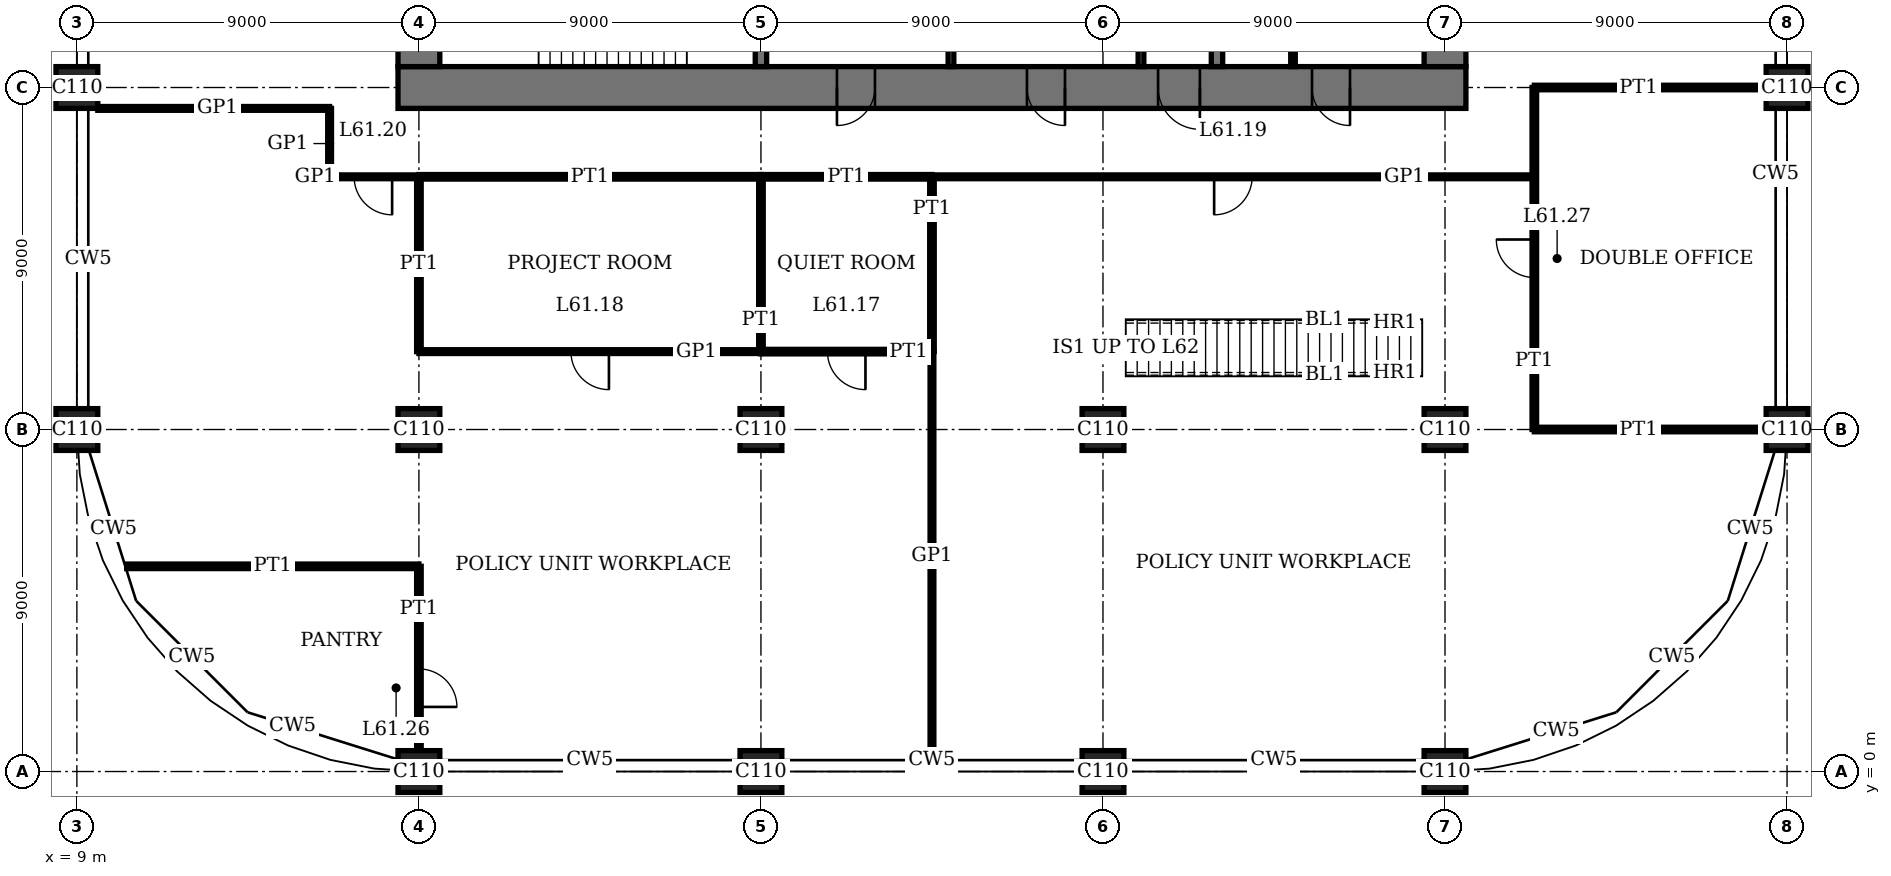
"""IFC4 building model, lengths in metres.
Left out: names, types, materials, properties, quantities, classifications, styles, units other than length and angle.
Written with IfcOpenShell. Run it as: python <this file> out.ifc"""

import sys

from ifc_helpers import new_model, si_unit, direction, frame, frame_2d, origin, origin_2d, place, context, subcontext, project, spatial, rectangle, extrude, element, fill, save


model = new_model("IFC4")
c1 = context("Model", 3, precision=1e-05, world=origin(), true_north=direction((0.0, 1.0)))
c2 = subcontext(c1, "Body", "Model", "MODEL_VIEW")
j1 = project(units=[si_unit("LENGTHUNIT", "METRE"), si_unit("PLANEANGLEUNIT", "RADIAN")], contexts=[c1])
p1 = place(None, origin())
s1 = spatial("IfcSite", under=j1, at=p1, CompositionType="ELEMENT")
p2 = place(p1, origin())
s2 = spatial("IfcBuilding", under=s1, at=p2, CompositionType="ELEMENT")
p3 = place(p2, frame((0.0, 0.0, 251.4)))
s3 = spatial("IfcBuildingStorey", under=s2, at=p3, CompositionType="ELEMENT", Elevation=251.4)
for number, where, z_axis, x_axis in (
    (1, (9.0, 9.0, 0.0), (0.0, 0.0, 1.0), (1.0, 0.0, 0.0)),
    (2, (9.0, 18.0, 0.0), (0.0, 0.0, 1.0), (1.0, 0.0, 0.0)),
    (3, (18.0, 0.0, 0.0), (0.0, 0.0, 1.0), (1.0, 0.0, 0.0)),
    (4, (18.0, 9.0, 0.0), (0.0, 0.0, 1.0), (1.0, 0.0, 0.0)),
    (5, (27.0, 0.0, 0.0), (0.0, 0.0, 1.0), (1.0, 0.0, 0.0)),
    (6, (27.0, 9.0, 0.0), (0.0, 0.0, 1.0), (1.0, 0.0, 0.0)),
    (7, (36.0, 0.0, 0.0), (0.0, 0.0, 1.0), (1.0, 0.0, 0.0)),
    (8, (36.0, 9.0, 0.0), (0.0, 0.0, 1.0), (1.0, 0.0, 0.0)),
    (9, (45.0, 0.0, 0.0), (0.0, 0.0, 1.0), (1.0, 0.0, 0.0)),
    (10, (45.0, 9.0, 0.0), (0.0, 0.0, 1.0), (1.0, 0.0, 0.0)),
    (11, (54.0, 9.0, 0.0), (0.0, 0.0, 1.0), (1.0, 0.0, 0.0)),
    (12, (54.0, 18.0, 0.0), (0.0, 0.0, 1.0), (1.0, 0.0, 0.0)),
):
    element("IfcColumn", number, at=place(p3, frame(where, z_axis=z_axis, x_axis=x_axis)), inside=s3, PredefinedType="COLUMN", context=c2, shape_type="SweptSolid", body=[
        extrude(rectangle(XDim=1.1, YDim=1.1, at=origin_2d()), origin(), (0.0, 0.0, 1.0), 4.0),
    ])
p4 = place(p3, frame((17.45, 18.0, 0.0), z_axis=(0.0, 0.0, 1.0), x_axis=(1.0, 0.0, 0.0)))
e13 = element("IfcWall", 13, at=p4, inside=s3, PredefinedType="SHEAR", context=c2, shape_type="SweptSolid", body=[
    extrude(rectangle(XDim=28.1, YDim=1.1, at=frame_2d((14.05, 0.0))), origin(), (0.0, 0.0, 1.0), 4.0),
])
p5 = place(p4, frame((11.55, 0.0, 0.0)))
e14 = element("IfcOpeningElement", 14, at=p5, cuts=e13, PredefinedType="OPENING", context=c2, shape_type="SweptSolid", body=[
    extrude(rectangle(XDim=1.0, YDim=2.4, at=frame_2d((0.5, 1.2))), frame((0.0, 0.56, 0.0), z_axis=(0.0, -1.0, 0.0), x_axis=(1.0, 0.0, 0.0)), (0.0, 0.0, 1.0), 1.12),
])
p6 = place(p4, frame((16.55, 0.0, 0.0)))
e15 = element("IfcOpeningElement", 15, at=p6, cuts=e13, PredefinedType="OPENING", context=c2, shape_type="SweptSolid", body=[
    extrude(rectangle(XDim=1.0, YDim=2.4, at=frame_2d((0.5, 1.2))), frame((0.0, 0.56, 0.0), z_axis=(0.0, -1.0, 0.0), x_axis=(1.0, 0.0, 0.0)), (0.0, 0.0, 1.0), 1.12),
])
p7 = place(p4, frame((20.0, 0.0, 0.0)))
e16 = element("IfcOpeningElement", 16, at=p7, cuts=e13, PredefinedType="OPENING", context=c2, shape_type="SweptSolid", body=[
    extrude(rectangle(XDim=1.1, YDim=2.4, at=frame_2d((0.55, 1.2))), frame((0.0, 0.56, 0.0), z_axis=(0.0, -1.0, 0.0), x_axis=(1.0, 0.0, 0.0)), (0.0, 0.0, 1.0), 1.12),
])
p8 = place(p4, frame((24.05, 0.0, 0.0)))
e17 = element("IfcOpeningElement", 17, at=p8, cuts=e13, PredefinedType="OPENING", context=c2, shape_type="SweptSolid", body=[
    extrude(rectangle(XDim=1.0, YDim=2.4, at=frame_2d((0.5, 1.2))), frame((0.0, 0.56, 0.0), z_axis=(0.0, -1.0, 0.0), x_axis=(1.0, 0.0, 0.0)), (0.0, 0.0, 1.0), 1.12),
])
p9 = place(p3, frame((18.0, 35.45, 0.0), z_axis=(0.0, 0.0, 1.0), x_axis=(0.0, -1.0, 0.0)))
e18 = element("IfcWall", 18, at=p9, inside=s3, PredefinedType="SHEAR", context=c2, shape_type="SweptSolid", body=[
    extrude(rectangle(XDim=16.9, YDim=1.1, at=frame_2d((8.45, 0.0))), origin(), (0.0, 0.0, 1.0), 4.0),
])
p10 = place(p9, frame((8.45, 0.0, 0.0)))
e19 = element("IfcOpeningElement", 19, at=p10, cuts=e18, PredefinedType="OPENING", context=c2, shape_type="SweptSolid", body=[
    extrude(rectangle(XDim=1.8, YDim=2.4, at=frame_2d((0.9, 1.2))), frame((0.0, 0.56, 0.0), z_axis=(0.0, -1.0, 0.0), x_axis=(1.0, 0.0, 0.0)), (0.0, 0.0, 1.0), 1.12),
])
p11 = place(p3, frame((45.0, 18.55, 0.0), z_axis=(0.0, 0.0, 1.0), x_axis=(0.0, 1.0, 0.0)))
e20 = element("IfcWall", 20, at=p11, inside=s3, PredefinedType="SHEAR", context=c2, shape_type="SweptSolid", body=[
    extrude(rectangle(XDim=16.9, YDim=1.1, at=frame_2d((8.45, 0.0))), origin(), (0.0, 0.0, 1.0), 4.0),
])
p12 = place(p11, frame((8.45, 0.0, 0.0)))
e21 = element("IfcOpeningElement", 21, at=p12, cuts=e20, PredefinedType="OPENING", context=c2, shape_type="SweptSolid", body=[
    extrude(rectangle(XDim=1.8, YDim=2.4, at=frame_2d((0.9, 1.2))), frame((0.0, 0.56, 0.0), z_axis=(0.0, -1.0, 0.0), x_axis=(1.0, 0.0, 0.0)), (0.0, 0.0, 1.0), 1.12),
])
p13 = place(p3, frame((27.0, 18.55, 0.0), z_axis=(0.0, 0.0, 1.0), x_axis=(0.0, 1.0, 0.0)))
e22 = element("IfcWall", 22, at=p13, inside=s3, PredefinedType="SHEAR", context=c2, shape_type="SweptSolid", body=[
    extrude(rectangle(XDim=3.05, YDim=0.3, at=frame_2d((1.525, 0.0))), origin(), (0.0, 0.0, 1.0), 4.0),
])
p14 = place(p3, frame((39.0, 18.55, 0.0), z_axis=(0.0, 0.0, 1.0), x_axis=(0.0, 1.0, 0.0)))
e23 = element("IfcWall", 23, at=p14, inside=s3, PredefinedType="SHEAR", context=c2, shape_type="SweptSolid", body=[
    extrude(rectangle(XDim=5.9, YDim=0.3, at=frame_2d((2.95, 0.0))), origin(), (0.0, 0.0, 1.0), 4.0),
])
p15 = place(p3, frame((10.31, 5.4, 0.0), z_axis=(0.0, 0.0, 1.0), x_axis=(1.0, 0.0, 0.0)))
e24 = element("IfcWall", 24, at=p15, inside=s3, PredefinedType="PARTITIONING", context=c2, shape_type="SweptSolid", body=[
    extrude(rectangle(XDim=7.69, YDim=0.12, at=frame_2d((3.845, 0.0))), origin(), (0.0, 0.0, 1.0), 3.75),
])
p16 = place(p3, frame((47.35, 9.0, 0.0), z_axis=(0.0, 0.0, 1.0), x_axis=(1.0, 0.0, 0.0)))
e25 = element("IfcWall", 25, at=p16, inside=s3, PredefinedType="PARTITIONING", context=c2, shape_type="SweptSolid", body=[
    extrude(rectangle(XDim=6.1, YDim=0.12, at=frame_2d((3.05, 0.0))), origin(), (0.0, 0.0, 1.0), 3.05),
])
p17 = place(p3, frame((27.0, 11.05, 0.0), z_axis=(0.0, 0.0, 1.0), x_axis=(1.0, 0.0, 0.0)))
e26 = element("IfcWall", 26, at=p17, inside=s3, PredefinedType="PARTITIONING", context=c2, shape_type="SweptSolid", body=[
    extrude(rectangle(XDim=4.5, YDim=0.12, at=frame_2d((2.25, 0.0))), origin(), (0.0, 0.0, 1.0), 3.75),
])
p18 = place(p17, frame((1.75, 0.0, 0.0)))
e27 = element("IfcOpeningElement", 27, at=p18, cuts=e26, PredefinedType="OPENING", context=c2, shape_type="SweptSolid", body=[
    extrude(rectangle(XDim=1.0, YDim=2.4, at=frame_2d((0.5, 1.2))), frame((0.0, 0.07, 0.0), z_axis=(0.0, -1.0, 0.0), x_axis=(1.0, 0.0, 0.0)), (0.0, 0.0, 1.0), 0.14),
])
p19 = place(p3, frame((18.0, 11.05, 0.0), z_axis=(0.0, 0.0, 1.0), x_axis=(1.0, 0.0, 0.0)))
e28 = element("IfcWall", 28, at=p19, inside=s3, PredefinedType="PARTITIONING", context=c2, shape_type="SweptSolid", body=[
    extrude(rectangle(XDim=9.0, YDim=0.1, at=frame_2d((4.5, 0.0))), origin(), (0.0, 0.0, 1.0), 3.75),
])
p20 = place(p19, frame((4.0, 0.0, 0.0)))
e29 = element("IfcOpeningElement", 29, at=p20, cuts=e28, PredefinedType="OPENING", context=c2, shape_type="SweptSolid", body=[
    extrude(rectangle(XDim=1.0, YDim=2.4, at=frame_2d((0.5, 1.2))), frame((0.0, 0.06, 0.0), z_axis=(0.0, -1.0, 0.0), x_axis=(1.0, 0.0, 0.0)), (0.0, 0.0, 1.0), 0.12),
])
p21 = place(p3, frame((18.0, 15.65, 0.0), z_axis=(0.0, 0.0, 1.0), x_axis=(1.0, 0.0, 0.0)))
e30 = element("IfcWall", 30, at=p21, inside=s3, PredefinedType="PARTITIONING", context=c2, shape_type="SweptSolid", body=[
    extrude(rectangle(XDim=9.0, YDim=0.12, at=frame_2d((4.5, 0.0))), origin(), (0.0, 0.0, 1.0), 3.75),
])
p22 = place(p3, frame((27.0, 15.65, 0.0), z_axis=(0.0, 0.0, 1.0), x_axis=(1.0, 0.0, 0.0)))
e31 = element("IfcWall", 31, at=p22, inside=s3, PredefinedType="PARTITIONING", context=c2, shape_type="SweptSolid", body=[
    extrude(rectangle(XDim=4.5, YDim=0.12, at=frame_2d((2.25, 0.0))), origin(), (0.0, 0.0, 1.0), 3.75),
])
p23 = place(p3, frame((31.51, 15.65, 0.0), z_axis=(0.0, 0.0, 1.0), x_axis=(1.0, 0.0, 0.0)))
e32 = element("IfcWall", 32, at=p23, inside=s3, PredefinedType="PARTITIONING", context=c2, shape_type="SweptSolid", body=[
    extrude(rectangle(XDim=15.83, YDim=0.1, at=frame_2d((7.915, 0.0))), origin(), (0.0, 0.0, 1.0), 3.75),
])
p24 = place(p23, frame((7.415, 0.0, 0.0)))
e33 = element("IfcOpeningElement", 33, at=p24, cuts=e32, PredefinedType="OPENING", context=c2, shape_type="SweptSolid", body=[
    extrude(rectangle(XDim=1.0, YDim=2.4, at=frame_2d((0.5, 1.2))), frame((0.0, 0.06, 0.0), z_axis=(0.0, -1.0, 0.0), x_axis=(1.0, 0.0, 0.0)), (0.0, 0.0, 1.0), 0.12),
])
p25 = place(p3, frame((15.6, 15.65, 0.0), z_axis=(0.0, 0.0, 1.0), x_axis=(1.0, 0.0, 0.0)))
e34 = element("IfcWall", 34, at=p25, inside=s3, PredefinedType="PARTITIONING", context=c2, shape_type="SweptSolid", body=[
    extrude(rectangle(XDim=2.39, YDim=0.1, at=frame_2d((1.195, 0.0))), origin(), (0.0, 0.0, 1.0), 3.75),
])
p26 = place(p25, frame((0.695, 0.0, 0.0)))
e35 = element("IfcOpeningElement", 35, at=p26, cuts=e34, PredefinedType="OPENING", context=c2, shape_type="SweptSolid", body=[
    extrude(rectangle(XDim=1.0, YDim=2.4, at=frame_2d((0.5, 1.2))), frame((0.0, 0.06, 0.0), z_axis=(0.0, -1.0, 0.0), x_axis=(1.0, 0.0, 0.0)), (0.0, 0.0, 1.0), 0.12),
])
p27 = place(p3, frame((9.55, 17.45, 0.0), z_axis=(0.0, 0.0, 1.0), x_axis=(1.0, 0.0, 0.0)))
e36 = element("IfcWall", 36, at=p27, inside=s3, PredefinedType="PARTITIONING", context=c2, shape_type="SweptSolid", body=[
    extrude(rectangle(XDim=6.1, YDim=0.1, at=frame_2d((3.05, 0.0))), origin(), (0.0, 0.0, 1.0), 3.75),
])
p28 = place(p3, frame((47.35, 18.0, 0.0), z_axis=(0.0, 0.0, 1.0), x_axis=(1.0, 0.0, 0.0)))
e37 = element("IfcWall", 37, at=p28, inside=s3, PredefinedType="PARTITIONING", context=c2, shape_type="SweptSolid", body=[
    extrude(rectangle(XDim=6.1, YDim=0.12, at=frame_2d((3.05, 0.0))), origin(), (0.0, 0.0, 1.0), 3.05),
])
p29 = place(p3, frame((15.65, 15.6, 0.0), z_axis=(0.0, 0.0, 1.0), x_axis=(0.0, 1.0, 0.0)))
e38 = element("IfcWall", 38, at=p29, inside=s3, PredefinedType="PARTITIONING", context=c2, shape_type="SweptSolid", body=[
    extrude(rectangle(XDim=1.85, YDim=0.1, at=frame_2d((0.925, 0.0))), origin(), (0.0, 0.0, 1.0), 3.75),
])
p30 = place(p3, frame((18.0, 11.05, 0.0), z_axis=(0.0, 0.0, 1.0), x_axis=(0.0, 1.0, 0.0)))
e39 = element("IfcWall", 39, at=p30, inside=s3, PredefinedType="PARTITIONING", context=c2, shape_type="SweptSolid", body=[
    extrude(rectangle(XDim=4.6, YDim=0.12, at=frame_2d((2.3, 0.0))), origin(), (0.0, 0.0, 1.0), 3.05),
])
p31 = place(p3, frame((18.0, 0.55, 0.0), z_axis=(0.0, 0.0, 1.0), x_axis=(0.0, 1.0, 0.0)))
e40 = element("IfcWall", 40, at=p31, inside=s3, PredefinedType="PARTITIONING", context=c2, shape_type="SweptSolid", body=[
    extrude(rectangle(XDim=4.85, YDim=0.12, at=frame_2d((2.425, 0.0))), origin(), (0.0, 0.0, 1.0), 3.05),
])
p32 = place(p31, frame((1.15, 0.0, 0.0)))
e41 = element("IfcOpeningElement", 41, at=p32, cuts=e40, PredefinedType="OPENING", context=c2, shape_type="SweptSolid", body=[
    extrude(rectangle(XDim=1.0, YDim=2.4, at=frame_2d((0.5, 1.2))), frame((0.0, 0.07, 0.0), z_axis=(0.0, -1.0, 0.0), x_axis=(1.0, 0.0, 0.0)), (0.0, 0.0, 1.0), 0.14),
])
p33 = place(p3, frame((27.0, 11.05, 0.0), z_axis=(0.0, 0.0, 1.0), x_axis=(0.0, 1.0, 0.0)))
e42 = element("IfcWall", 42, at=p33, inside=s3, PredefinedType="PARTITIONING", context=c2, shape_type="SweptSolid", body=[
    extrude(rectangle(XDim=4.6, YDim=0.12, at=frame_2d((2.3, 0.0))), origin(), (0.0, 0.0, 1.0), 3.05),
])
p34 = place(p3, frame((31.5, 11.05, 0.0), z_axis=(0.0, 0.0, 1.0), x_axis=(0.0, 1.0, 0.0)))
e43 = element("IfcWall", 43, at=p34, inside=s3, PredefinedType="PARTITIONING", context=c2, shape_type="SweptSolid", body=[
    extrude(rectangle(XDim=4.6, YDim=0.12, at=frame_2d((2.3, 0.0))), origin(), (0.0, 0.0, 1.0), 3.75),
])
p35 = place(p3, frame((31.5, 0.31, 0.0), z_axis=(0.0, 0.0, 1.0), x_axis=(0.0, 1.0, 0.0)))
e44 = element("IfcWall", 44, at=p35, inside=s3, PredefinedType="PARTITIONING", context=c2, shape_type="SweptSolid", body=[
    extrude(rectangle(XDim=10.74, YDim=0.1, at=frame_2d((5.37, 0.0))), origin(), (0.0, 0.0, 1.0), 3.75),
])
p36 = place(p3, frame((47.35, 9.0, 0.0), z_axis=(0.0, 0.0, 1.0), x_axis=(0.0, 1.0, 0.0)))
e45 = element("IfcWall", 45, at=p36, inside=s3, PredefinedType="PARTITIONING", context=c2, shape_type="SweptSolid", body=[
    extrude(rectangle(XDim=9.0, YDim=0.12, at=frame_2d((4.5, 0.0))), origin(), (0.0, 0.0, 1.0), 3.75),
])
p37 = place(p36, frame((4.0, 0.0, 0.0)))
e46 = element("IfcOpeningElement", 46, at=p37, cuts=e45, PredefinedType="OPENING", context=c2, shape_type="SweptSolid", body=[
    extrude(rectangle(XDim=1.0, YDim=2.4, at=frame_2d((0.5, 1.2))), frame((0.0, 0.07, 0.0), z_axis=(0.0, -1.0, 0.0), x_axis=(1.0, 0.0, 0.0)), (0.0, 0.0, 1.0), 0.14),
])
for number, where, z_axis, x_axis in (
    (47, (32.0, 18.55, 0.0), (0.0, 0.0, 1.0), (0.0, 1.0, 0.0)),
    (48, (37.0, 18.55, 0.0), (0.0, 0.0, 1.0), (0.0, 1.0, 0.0)),
):
    element("IfcWall", number, at=place(p3, frame(where, z_axis=z_axis, x_axis=x_axis)), inside=s3, PredefinedType="PARTITIONING", context=c2, shape_type="SweptSolid", body=[
        extrude(rectangle(XDim=2.9, YDim=0.15, at=frame_2d((1.45, 0.0))), origin(), (0.0, 0.0, 1.0), 3.75),
    ])
p38 = place(p3, frame((41.0, 18.55, 0.0), z_axis=(0.0, 0.0, 1.0), x_axis=(0.0, 1.0, 0.0)))
e49 = element("IfcWall", 49, at=p38, inside=s3, PredefinedType="PARTITIONING", context=c2, shape_type="SweptSolid", body=[
    extrude(rectangle(XDim=2.9, YDim=0.12, at=frame_2d((1.45, 0.0))), origin(), (0.0, 0.0, 1.0), 3.75),
])
p39 = place(p38, frame((0.95, 0.0, 0.0)))
e50 = element("IfcOpeningElement", 50, at=p39, cuts=e49, PredefinedType="OPENING", context=c2, shape_type="SweptSolid", body=[
    extrude(rectangle(XDim=1.0, YDim=2.4, at=frame_2d((0.5, 1.2))), frame((0.0, 0.07, 0.0), z_axis=(0.0, -1.0, 0.0), x_axis=(1.0, 0.0, 0.0)), (0.0, 0.0, 1.0), 0.14),
])
p40 = place(p5, origin())
e51 = element("IfcDoor", 51, at=p40, inside=s3, OperationType="SINGLE_SWING_LEFT", PredefinedType="DOOR", context=c2, shape_type="SweptSolid", body=[
    extrude(rectangle(XDim=1.0, YDim=2.4, at=frame_2d((0.5, 1.2))), frame((0.0, 0.025, 0.0), z_axis=(0.0, -1.0, 0.0), x_axis=(1.0, 0.0, 0.0)), (0.0, 0.0, 1.0), 0.05),
    extrude(rectangle(XDim=0.04, YDim=2.4, at=frame_2d((0.02, 1.2))), frame((0.0, 0.4, 0.0), z_axis=(0.0, -1.0, 0.0), x_axis=(1.0, 0.0, 0.0)), (0.0, 0.0, 1.0), 0.8),
    extrude(rectangle(XDim=0.04, YDim=2.4, at=frame_2d((0.98, 1.2))), frame((0.0, 0.4, 0.0), z_axis=(0.0, -1.0, 0.0), x_axis=(1.0, 0.0, 0.0)), (0.0, 0.0, 1.0), 0.8),
    extrude(rectangle(XDim=1.0, YDim=0.04, at=frame_2d((0.5, 2.38))), frame((0.0, 0.4, 0.0), z_axis=(0.0, -1.0, 0.0), x_axis=(1.0, 0.0, 0.0)), (0.0, 0.0, 1.0), 0.8),
])
fill(e14, e51)
p41 = place(p6, origin())
e52 = element("IfcDoor", 52, at=p41, inside=s3, OperationType="SINGLE_SWING_RIGHT", PredefinedType="DOOR", context=c2, shape_type="SweptSolid", body=[
    extrude(rectangle(XDim=1.0, YDim=2.4, at=frame_2d((0.5, 1.2))), frame((0.0, 0.025, 0.0), z_axis=(0.0, -1.0, 0.0), x_axis=(1.0, 0.0, 0.0)), (0.0, 0.0, 1.0), 0.05),
    extrude(rectangle(XDim=0.04, YDim=2.4, at=frame_2d((0.02, 1.2))), frame((0.0, 0.4, 0.0), z_axis=(0.0, -1.0, 0.0), x_axis=(1.0, 0.0, 0.0)), (0.0, 0.0, 1.0), 0.8),
    extrude(rectangle(XDim=0.04, YDim=2.4, at=frame_2d((0.98, 1.2))), frame((0.0, 0.4, 0.0), z_axis=(0.0, -1.0, 0.0), x_axis=(1.0, 0.0, 0.0)), (0.0, 0.0, 1.0), 0.8),
    extrude(rectangle(XDim=1.0, YDim=0.04, at=frame_2d((0.5, 2.38))), frame((0.0, 0.4, 0.0), z_axis=(0.0, -1.0, 0.0), x_axis=(1.0, 0.0, 0.0)), (0.0, 0.0, 1.0), 0.8),
])
fill(e15, e52)
p42 = place(p7, origin())
e53 = element("IfcDoor", 53, at=p42, inside=s3, OperationType="SINGLE_SWING_RIGHT", PredefinedType="DOOR", context=c2, shape_type="SweptSolid", body=[
    extrude(rectangle(XDim=1.1, YDim=2.4, at=frame_2d((0.55, 1.2))), frame((0.0, 0.025, 0.0), z_axis=(0.0, -1.0, 0.0), x_axis=(1.0, 0.0, 0.0)), (0.0, 0.0, 1.0), 0.05),
    extrude(rectangle(XDim=0.04, YDim=2.4, at=frame_2d((0.02, 1.2))), frame((0.0, 0.44, 0.0), z_axis=(0.0, -1.0, 0.0), x_axis=(1.0, 0.0, 0.0)), (0.0, 0.0, 1.0), 0.88),
    extrude(rectangle(XDim=0.04, YDim=2.4, at=frame_2d((1.08, 1.2))), frame((0.0, 0.44, 0.0), z_axis=(0.0, -1.0, 0.0), x_axis=(1.0, 0.0, 0.0)), (0.0, 0.0, 1.0), 0.88),
    extrude(rectangle(XDim=1.1, YDim=0.04, at=frame_2d((0.55, 2.38))), frame((0.0, 0.44, 0.0), z_axis=(0.0, -1.0, 0.0), x_axis=(1.0, 0.0, 0.0)), (0.0, 0.0, 1.0), 0.88),
])
fill(e16, e53)
p43 = place(p8, origin())
e54 = element("IfcDoor", 54, at=p43, inside=s3, OperationType="SINGLE_SWING_RIGHT", PredefinedType="DOOR", context=c2, shape_type="SweptSolid", body=[
    extrude(rectangle(XDim=1.0, YDim=2.4, at=frame_2d((0.5, 1.2))), frame((0.0, 0.025, 0.0), z_axis=(0.0, -1.0, 0.0), x_axis=(1.0, 0.0, 0.0)), (0.0, 0.0, 1.0), 0.05),
    extrude(rectangle(XDim=0.04, YDim=2.4, at=frame_2d((0.02, 1.2))), frame((0.0, 0.4, 0.0), z_axis=(0.0, -1.0, 0.0), x_axis=(1.0, 0.0, 0.0)), (0.0, 0.0, 1.0), 0.8),
    extrude(rectangle(XDim=0.04, YDim=2.4, at=frame_2d((0.98, 1.2))), frame((0.0, 0.4, 0.0), z_axis=(0.0, -1.0, 0.0), x_axis=(1.0, 0.0, 0.0)), (0.0, 0.0, 1.0), 0.8),
    extrude(rectangle(XDim=1.0, YDim=0.04, at=frame_2d((0.5, 2.38))), frame((0.0, 0.4, 0.0), z_axis=(0.0, -1.0, 0.0), x_axis=(1.0, 0.0, 0.0)), (0.0, 0.0, 1.0), 0.8),
])
fill(e17, e54)
p44 = place(p18, origin())
e55 = element("IfcDoor", 55, at=p44, inside=s3, OperationType="SINGLE_SWING_RIGHT", PredefinedType="DOOR", context=c2, shape_type="SweptSolid", body=[
    extrude(rectangle(XDim=1.0, YDim=2.4, at=frame_2d((0.5, 1.2))), frame((0.0, 0.025, 0.0), z_axis=(0.0, -1.0, 0.0), x_axis=(1.0, 0.0, 0.0)), (0.0, 0.0, 1.0), 0.05),
])
fill(e27, e55)
p45 = place(p20, origin())
e56 = element("IfcDoor", 56, at=p45, inside=s3, OperationType="SINGLE_SWING_RIGHT", PredefinedType="DOOR", context=c2, shape_type="SweptSolid", body=[
    extrude(rectangle(XDim=1.0, YDim=2.4, at=frame_2d((0.5, 1.2))), frame((0.0, 0.02, 0.0), z_axis=(0.0, -1.0, 0.0), x_axis=(1.0, 0.0, 0.0)), (0.0, 0.0, 1.0), 0.04),
])
fill(e29, e56)
p46 = place(p24, origin())
e57 = element("IfcDoor", 57, at=p46, inside=s3, OperationType="SINGLE_SWING_LEFT", PredefinedType="DOOR", context=c2, shape_type="SweptSolid", body=[
    extrude(rectangle(XDim=1.0, YDim=2.4, at=frame_2d((0.5, 1.2))), frame((0.0, 0.02, 0.0), z_axis=(0.0, -1.0, 0.0), x_axis=(1.0, 0.0, 0.0)), (0.0, 0.0, 1.0), 0.04),
])
fill(e33, e57)
p47 = place(p26, origin())
e58 = element("IfcDoor", 58, at=p47, inside=s3, OperationType="SINGLE_SWING_RIGHT", PredefinedType="DOOR", context=c2, shape_type="SweptSolid", body=[
    extrude(rectangle(XDim=1.0, YDim=2.4, at=frame_2d((0.5, 1.2))), frame((0.0, 0.02, 0.0), z_axis=(0.0, -1.0, 0.0), x_axis=(1.0, 0.0, 0.0)), (0.0, 0.0, 1.0), 0.04),
])
fill(e35, e58)
p48 = place(p32, origin())
e59 = element("IfcDoor", 59, at=p48, inside=s3, OperationType="SINGLE_SWING_LEFT", PredefinedType="DOOR", context=c2, shape_type="SweptSolid", body=[
    extrude(rectangle(XDim=1.0, YDim=2.4, at=frame_2d((0.5, 1.2))), frame((0.0, 0.025, 0.0), z_axis=(0.0, -1.0, 0.0), x_axis=(1.0, 0.0, 0.0)), (0.0, 0.0, 1.0), 0.05),
])
fill(e41, e59)
p49 = place(p37, origin())
e60 = element("IfcDoor", 60, at=p49, inside=s3, OperationType="SINGLE_SWING_LEFT", PredefinedType="DOOR", context=c2, shape_type="SweptSolid", body=[
    extrude(rectangle(XDim=1.0, YDim=2.4, at=frame_2d((0.5, 1.2))), frame((0.0, 0.025, 0.0), z_axis=(0.0, -1.0, 0.0), x_axis=(1.0, 0.0, 0.0)), (0.0, 0.0, 1.0), 0.05),
])
fill(e46, e60)
save(model, sys.argv[1])
